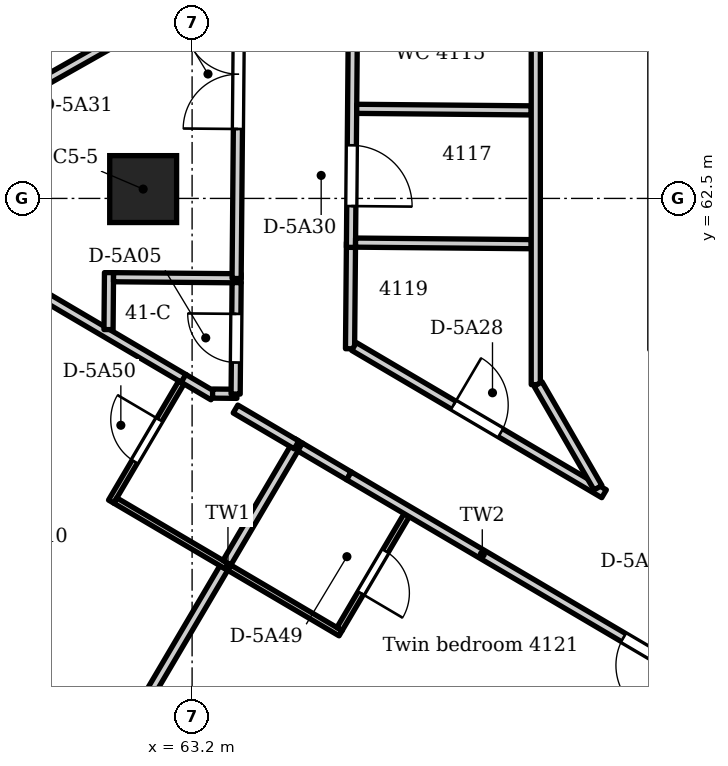
"""IFC4 building model, lengths in metres.
Left out: names, types, materials, properties, quantities, classifications, styles, units other than length and angle.
Written with IfcOpenShell. Run it as: python <this file> out.ifc"""

import sys

from ifc_helpers import new_model, si_unit, direction, frame, frame_2d, origin, origin_2d, place, context, subcontext, project, spatial, polyline, rectangle, circle, outline, extrude, element, fill, save


model = new_model("IFC4")
c1 = context("Model", 3, precision=1e-05, world=origin(), true_north=direction((0.0, 1.0)))
c2 = subcontext(c1, "Body", "Model", "MODEL_VIEW")
j1 = project(units=[si_unit("LENGTHUNIT", "METRE"), si_unit("PLANEANGLEUNIT", "RADIAN")], contexts=[c1])
p1 = place(None, origin())
s1 = spatial("IfcSite", under=j1, at=p1, CompositionType="ELEMENT")
p2 = place(p1, origin())
s2 = spatial("IfcBuilding", under=s1, at=p2, CompositionType="ELEMENT")
p3 = place(p2, frame((0.0, 0.0, 161.1)))
s3 = spatial("IfcBuildingStorey", under=s2, at=p3, CompositionType="ELEMENT", Elevation=161.1)
p4 = place(p3, frame((62.395, 62.654, -0.35), z_axis=(0.0, 0.0, 1.0), x_axis=(1.0, 0.0, 0.0)))
e1 = element("IfcColumn", 1, at=p4, inside=s3, PredefinedType="COLUMN", context=c2, shape_type="SweptSolid", body=[
    extrude(circle(Radius=0.55, at=origin_2d()), origin(), (0.0, 0.0, 1.0), 3.95),
])
p5 = place(p3, frame((90.139, 36.597, 0.0), z_axis=(0.0, 0.0, 1.0), x_axis=(-0.861630336939, 0.507536365659, 0.0)))
e2 = element("IfcWall", 2, at=p5, inside=s3, PredefinedType="SOLIDWALL", context=c2, shape_type="SweptSolid", body=[
    extrude(outline(polyline([(0.149, 0.075), (0.149, -0.075), (43.617, -0.075), (43.617, 0.075), (0.149, 0.075)])), origin(), (0.0, 0.0, 1.0), 3.3),
])
p6 = place(p5, frame((1.224, 0.0, 0.0)))
e3 = element("IfcOpeningElement", 3, at=p6, cuts=e2, PredefinedType="OPENING", context=c2, shape_type="SweptSolid", body=[
    extrude(rectangle(XDim=1.8, YDim=2.6, at=frame_2d((0.9, 1.3))), frame((0.0, 0.085, 0.0), z_axis=(0.0, -1.0, 0.0), x_axis=(1.0, 0.0, 0.0)), (0.0, 0.0, 1.0), 0.17),
])
p7 = place(p5, frame((4.571, 0.0, 0.0)))
e4 = element("IfcOpeningElement", 4, at=p7, cuts=e2, PredefinedType="OPENING", context=c2, shape_type="SweptSolid", body=[
    extrude(rectangle(XDim=1.8, YDim=2.6, at=frame_2d((0.9, 1.3))), frame((0.0, 0.085, 0.0), z_axis=(0.0, -1.0, 0.0), x_axis=(1.0, 0.0, 0.0)), (0.0, 0.0, 1.0), 0.17),
])
p8 = place(p5, frame((8.218, 0.0, 0.0)))
e5 = element("IfcOpeningElement", 5, at=p8, cuts=e2, PredefinedType="OPENING", context=c2, shape_type="SweptSolid", body=[
    extrude(rectangle(XDim=1.8, YDim=2.6, at=frame_2d((0.9, 1.3))), frame((0.0, 0.085, 0.0), z_axis=(0.0, -1.0, 0.0), x_axis=(1.0, 0.0, 0.0)), (0.0, 0.0, 1.0), 0.17),
])
p9 = place(p5, frame((11.865, 0.0, 0.0)))
e6 = element("IfcOpeningElement", 6, at=p9, cuts=e2, PredefinedType="OPENING", context=c2, shape_type="SweptSolid", body=[
    extrude(rectangle(XDim=1.8, YDim=2.6, at=frame_2d((0.9, 1.3))), frame((0.0, 0.085, 0.0), z_axis=(0.0, -1.0, 0.0), x_axis=(1.0, 0.0, 0.0)), (0.0, 0.0, 1.0), 0.17),
])
p10 = place(p5, frame((15.512, 0.0, 0.0)))
e7 = element("IfcOpeningElement", 7, at=p10, cuts=e2, PredefinedType="OPENING", context=c2, shape_type="SweptSolid", body=[
    extrude(rectangle(XDim=1.8, YDim=2.6, at=frame_2d((0.9, 1.3))), frame((0.0, 0.085, 0.0), z_axis=(0.0, -1.0, 0.0), x_axis=(1.0, 0.0, 0.0)), (0.0, 0.0, 1.0), 0.17),
])
p11 = place(p5, frame((19.16, 0.0, 0.0)))
e8 = element("IfcOpeningElement", 8, at=p11, cuts=e2, PredefinedType="OPENING", context=c2, shape_type="SweptSolid", body=[
    extrude(rectangle(XDim=1.8, YDim=2.6, at=frame_2d((0.9, 1.3))), frame((0.0, 0.085, 0.0), z_axis=(0.0, -1.0, 0.0), x_axis=(1.0, 0.0, 0.0)), (0.0, 0.0, 1.0), 0.17),
])
p12 = place(p5, frame((22.807, 0.0, 0.0)))
e9 = element("IfcOpeningElement", 9, at=p12, cuts=e2, PredefinedType="OPENING", context=c2, shape_type="SweptSolid", body=[
    extrude(rectangle(XDim=1.8, YDim=2.6, at=frame_2d((0.9, 1.3))), frame((0.0, 0.085, 0.0), z_axis=(0.0, -1.0, 0.0), x_axis=(1.0, 0.0, 0.0)), (0.0, 0.0, 1.0), 0.17),
])
p13 = place(p5, frame((26.454, 0.0, 0.0)))
e10 = element("IfcOpeningElement", 10, at=p13, cuts=e2, PredefinedType="OPENING", context=c2, shape_type="SweptSolid", body=[
    extrude(rectangle(XDim=1.8, YDim=2.6, at=frame_2d((0.9, 1.3))), frame((0.0, 0.085, 0.0), z_axis=(0.0, -1.0, 0.0), x_axis=(1.0, 0.0, 0.0)), (0.0, 0.0, 1.0), 0.17),
])
p14 = place(p5, frame((30.101, 0.0, 0.0)))
e11 = element("IfcOpeningElement", 11, at=p14, cuts=e2, PredefinedType="OPENING", context=c2, shape_type="SweptSolid", body=[
    extrude(rectangle(XDim=1.8, YDim=2.6, at=frame_2d((0.9, 1.3))), frame((0.0, 0.085, 0.0), z_axis=(0.0, -1.0, 0.0), x_axis=(1.0, 0.0, 0.0)), (0.0, 0.0, 1.0), 0.17),
])
p15 = place(p5, frame((33.748, 0.0, 0.0)))
e12 = element("IfcOpeningElement", 12, at=p15, cuts=e2, PredefinedType="OPENING", context=c2, shape_type="SweptSolid", body=[
    extrude(rectangle(XDim=1.8, YDim=2.6, at=frame_2d((0.9, 1.3))), frame((0.0, 0.085, 0.0), z_axis=(0.0, -1.0, 0.0), x_axis=(1.0, 0.0, 0.0)), (0.0, 0.0, 1.0), 0.17),
])
p16 = place(p5, frame((37.396, 0.0, 0.0)))
e13 = element("IfcOpeningElement", 13, at=p16, cuts=e2, PredefinedType="OPENING", context=c2, shape_type="SweptSolid", body=[
    extrude(rectangle(XDim=1.8, YDim=2.6, at=frame_2d((0.9, 1.3))), frame((0.0, 0.085, 0.0), z_axis=(0.0, -1.0, 0.0), x_axis=(1.0, 0.0, 0.0)), (0.0, 0.0, 1.0), 0.17),
])
p17 = place(p5, frame((40.743, 0.0, 0.0)))
e14 = element("IfcOpeningElement", 14, at=p17, cuts=e2, PredefinedType="OPENING", context=c2, shape_type="SweptSolid", body=[
    extrude(rectangle(XDim=1.8, YDim=2.6, at=frame_2d((0.9, 1.3))), frame((0.0, 0.085, 0.0), z_axis=(0.0, -1.0, 0.0), x_axis=(1.0, 0.0, 0.0)), (0.0, 0.0, 1.0), 0.17),
])
p18 = place(p3, frame((58.694, 62.112, 0.0), z_axis=(0.0, 0.0, 1.0), x_axis=(0.861647069411, -0.507507958336, 0.0)))
e15 = element("IfcWall", 15, at=p18, inside=s3, PredefinedType="PARTITIONING", context=c2, shape_type="SweptSolid", body=[
    extrude(rectangle(XDim=5.073, YDim=0.15, at=frame_2d((2.537, 0.0))), origin(), (0.0, 0.0, 1.0), 3.3),
])
p19 = place(p3, frame((60.113, 64.057, 0.0), z_axis=(0.0, 0.0, 1.0), x_axis=(0.870300828713, 0.492520524995, 0.0)))
e16 = element("IfcWall", 16, at=p19, inside=s3, PredefinedType="PARTITIONING", context=c2, shape_type="SweptSolid", body=[
    extrude(rectangle(XDim=3.906, YDim=0.15, at=frame_2d((1.953, 0.0))), origin(), (0.0, 0.0, 1.0), 3.3),
])
p20 = place(p3, frame((61.826, 60.343, 0.0), z_axis=(0.0, 0.0, 1.0), x_axis=(0.008337386084, 0.999965243393, 0.0)))
e17 = element("IfcWall", 17, at=p20, inside=s3, PredefinedType="PARTITIONING", context=c2, shape_type="SweptSolid", body=[
    extrude(rectangle(XDim=0.937, YDim=0.15, at=frame_2d((0.469, 0.0))), origin(), (0.0, 0.0, 1.0), 3.3),
])
p21 = place(p3, frame((61.908, 61.204, 0.0), z_axis=(0.0, 0.0, 1.0), x_axis=(0.999962964822, -0.008606333961, 0.0)))
e18 = element("IfcWall", 18, at=p21, inside=s3, PredefinedType="PARTITIONING", context=c2, shape_type="SweptSolid", body=[
    extrude(rectangle(XDim=2.099, YDim=0.15, at=frame_2d((1.05, 0.0))), origin(), (0.0, 0.0, 1.0), 3.3),
])
p22 = place(p3, frame((61.894, 53.322, 0.0), z_axis=(0.0, 0.0, 1.0), x_axis=(0.507657247854, 0.86155912084, 0.0)))
e19 = element("IfcWall", 19, at=p22, inside=s3, PredefinedType="PARTITIONING", context=c2, shape_type="SweptSolid", body=[
    extrude(rectangle(XDim=3.6, YDim=0.15, at=frame_2d((1.8, 0.0))), origin(), (0.0, 0.0, 1.0), 3.3),
])
p23 = place(p3, frame((61.869, 57.514, 0.0), z_axis=(0.0, 0.0, 1.0), x_axis=(0.50769515182, 0.861536785528, 0.0)))
e20 = element("IfcWall", 20, at=p23, inside=s3, PredefinedType="PARTITIONING", context=c2, shape_type="SweptSolid", body=[
    extrude(rectangle(XDim=2.276, YDim=0.1, at=frame_2d((1.138, 0.0))), origin(), (0.0, 0.0, 1.0), 3.3),
])
p24 = place(p23, frame((0.763, 0.0, 0.0)))
e21 = element("IfcOpeningElement", 21, at=p24, cuts=e20, PredefinedType="OPENING", context=c2, shape_type="SweptSolid", body=[
    extrude(rectangle(XDim=0.8, YDim=2.1, at=frame_2d((0.4, 1.05))), frame((0.0, 0.06, 0.0), z_axis=(0.0, -1.0, 0.0), x_axis=(1.0, 0.0, 0.0)), (0.0, 0.0, 1.0), 0.12),
])
p25 = place(p3, frame((61.937, 57.531, 0.0), z_axis=(0.0, 0.0, 1.0), x_axis=(0.861687435641, -0.507439418313, 0.0)))
e22 = element("IfcWall", 22, at=p25, inside=s3, PredefinedType="PARTITIONING", context=c2, shape_type="SweptSolid", body=[
    extrude(rectangle(XDim=4.3, YDim=0.1, at=frame_2d((2.15, 0.0))), origin(), (0.0, 0.0, 1.0), 3.3),
])
p26 = place(p3, frame((63.059, 59.541, 0.0), z_axis=(0.0, 0.0, 1.0), x_axis=(0.861380392191, -0.507960451167, 0.0)))
e23 = element("IfcWall", 23, at=p26, inside=s3, PredefinedType="PARTITIONING", context=c2, shape_type="SweptSolid", body=[
    extrude(rectangle(XDim=0.567, YDim=0.15, at=frame_2d((0.284, 0.0))), origin(), (0.0, 0.0, 1.0), 3.3),
])
p27 = place(p3, frame((63.537, 59.291, 0.0), z_axis=(0.0, 0.0, 1.0), x_axis=(0.99995807265, -0.009157125207, 0.0)))
e24 = element("IfcWall", 24, at=p27, inside=s3, PredefinedType="PARTITIONING", context=c2, shape_type="SweptSolid", body=[
    extrude(rectangle(XDim=0.4, YDim=0.15, at=frame_2d((0.2, 0.0))), origin(), (0.0, 0.0, 1.0), 3.3),
])
p28 = place(p3, frame((63.772, 56.509, 0.0), z_axis=(0.0, 0.0, 1.0), x_axis=(0.507359649966, 0.861734405479, 0.0)))
e25 = element("IfcWall", 25, at=p28, inside=s3, PredefinedType="PARTITIONING", context=c2, shape_type="SweptSolid", body=[
    extrude(rectangle(XDim=2.325, YDim=0.15, at=frame_2d((1.163, 0.0))), origin(), (0.0, 0.0, 1.0), 3.3),
])
p29 = place(p3, frame((63.914, 59.037, 0.0), z_axis=(0.0, 0.0, 1.0), x_axis=(0.861518804546, -0.507725663536, 0.0)))
e26 = element("IfcWall", 26, at=p29, inside=s3, PredefinedType="PARTITIONING", context=c2, shape_type="SweptSolid", body=[
    extrude(rectangle(XDim=1.164, YDim=0.15, at=frame_2d((0.582, 0.0))), origin(), (0.0, 0.0, 1.0), 3.3),
])
p30 = place(p3, frame((63.916, 59.283, 0.0), z_axis=(0.0, 0.0, 1.0), x_axis=(0.008923459297, 0.999960185144, 0.0)))
e27 = element("IfcWall", 27, at=p30, inside=s3, PredefinedType="PARTITIONING", context=c2, shape_type="SweptSolid", body=[
    extrude(rectangle(XDim=1.833, YDim=0.15, at=frame_2d((0.917, 0.0))), origin(), (0.0, 0.0, 1.0), 3.3),
])
p31 = place(p30, frame((0.519, 0.0, 0.0)))
e28 = element("IfcOpeningElement", 28, at=p31, cuts=e27, PredefinedType="OPENING", context=c2, shape_type="SweptSolid", body=[
    extrude(rectangle(XDim=0.8, YDim=2.1, at=frame_2d((0.4, 1.05))), frame((0.0, 0.085, 0.0), z_axis=(0.0, -1.0, 0.0), x_axis=(1.0, 0.0, 0.0)), (0.0, 0.0, 1.0), 0.17),
])
p32 = place(p3, frame((63.932, 61.183, 0.0), z_axis=(0.0, 0.0, 1.0), x_axis=(0.008717466764, 0.999962002165, 0.0)))
e29 = element("IfcWall", 29, at=p32, inside=s3, PredefinedType="PARTITIONING", context=c2, shape_type="SweptSolid", body=[
    extrude(rectangle(XDim=4.985, YDim=0.15, at=frame_2d((2.493, 0.0))), origin(), (0.0, 0.0, 1.0), 2.75),
])
p33 = place(p32, frame((2.459, 0.0, 0.0)))
e30 = element("IfcOpeningElement", 30, at=p33, cuts=e29, PredefinedType="OPENING", context=c2, shape_type="SweptSolid", body=[
    extrude(rectangle(XDim=1.8, YDim=2.1, at=frame_2d((0.9, 1.05))), frame((0.0, 0.085, 0.0), z_axis=(0.0, -1.0, 0.0), x_axis=(1.0, 0.0, 0.0)), (0.0, 0.0, 1.0), 0.17),
])
p34 = place(p3, frame((64.976, 58.412, 0.0), z_axis=(0.0, 0.0, 1.0), x_axis=(0.861348284073, -0.508014894982, 0.0)))
e31 = element("IfcWall", 31, at=p34, inside=s3, PredefinedType="PARTITIONING", context=c2, shape_type="SweptSolid", body=[
    extrude(rectangle(XDim=0.933, YDim=0.15, at=frame_2d((0.466, 0.0))), origin(), (0.0, 0.0, 1.0), 3.3),
])
p35 = place(p3, frame((65.625, 55.418, 0.0), z_axis=(0.0, 0.0, 1.0), x_axis=(0.507893177668, 0.861420060179, 0.0)))
e32 = element("IfcWall", 32, at=p35, inside=s3, PredefinedType="PARTITIONING", context=c2, shape_type="SweptSolid", body=[
    extrude(rectangle(XDim=2.175, YDim=0.1, at=frame_2d((1.087, 0.0))), origin(), (0.0, 0.0, 1.0), 3.3),
])
p36 = place(p35, frame((0.687, 0.0, 0.0)))
e33 = element("IfcOpeningElement", 33, at=p36, cuts=e32, PredefinedType="OPENING", context=c2, shape_type="SweptSolid", body=[
    extrude(rectangle(XDim=0.8, YDim=2.1, at=frame_2d((0.4, 1.05))), frame((0.0, 0.06, 0.0), z_axis=(0.0, -1.0, 0.0), x_axis=(1.0, 0.0, 0.0)), (0.0, 0.0, 1.0), 0.12),
])
p37 = place(p3, frame((65.779, 57.938, 0.0), z_axis=(0.0, 0.0, 1.0), x_axis=(0.861623120435, -0.507548616718, 0.0)))
e34 = element("IfcWall", 34, at=p37, inside=s3, PredefinedType="PARTITIONING", context=c2, shape_type="SweptSolid", body=[
    extrude(rectangle(XDim=7.004, YDim=0.15, at=frame_2d((3.502, 0.0))), origin(), (0.0, 0.0, 1.0), 3.3),
])
p38 = place(p37, frame((5.24, 0.0, 0.0)))
e35 = element("IfcOpeningElement", 35, at=p38, cuts=e34, PredefinedType="OPENING", context=c2, shape_type="SweptSolid", body=[
    extrude(rectangle(XDim=0.9, YDim=2.1, at=frame_2d((0.45, 1.05))), frame((0.0, 0.085, 0.0), z_axis=(0.0, -1.0, 0.0), x_axis=(1.0, 0.0, 0.0)), (0.0, 0.0, 1.0), 0.17),
])
p39 = place(p3, frame((65.797, 60.028, 0.0), z_axis=(0.0, 0.0, 1.0), x_axis=(0.00892821556, 0.999960142689, 0.0)))
e36 = element("IfcWall", 36, at=p39, inside=s3, PredefinedType="PARTITIONING", context=c2, shape_type="SweptSolid", body=[
    extrude(rectangle(XDim=1.75, YDim=0.15, at=frame_2d((0.875, 0.0))), origin(), (0.0, 0.0, 1.0), 3.3),
])
p40 = place(p3, frame((65.863, 60.065, 0.0), z_axis=(0.0, 0.0, 1.0), x_axis=(0.861635540959, -0.507527530835, 0.0)))
e37 = element("IfcWall", 37, at=p40, inside=s3, PredefinedType="PARTITIONING", context=c2, shape_type="SweptSolid", body=[
    extrude(rectangle(XDim=4.772, YDim=0.15, at=frame_2d((2.386, 0.0))), origin(), (0.0, 0.0, 1.0), 3.3),
])
p41 = place(p40, frame((1.899, 0.0, 0.0)))
e38 = element("IfcOpeningElement", 38, at=p41, cuts=e37, PredefinedType="OPENING", context=c2, shape_type="SweptSolid", body=[
    extrude(rectangle(XDim=0.9, YDim=2.1, at=frame_2d((0.45, 1.05))), frame((0.0, 0.085, 0.0), z_axis=(0.0, -1.0, 0.0), x_axis=(1.0, 0.0, 0.0)), (0.0, 0.0, 1.0), 0.17),
])
p42 = place(p3, frame((65.812, 61.695, 0.0), z_axis=(0.0, 0.0, 1.0), x_axis=(0.008521236962, 0.999963693601, 0.0)))
e39 = element("IfcWall", 39, at=p42, inside=s3, PredefinedType="PARTITIONING", context=c2, shape_type="SweptSolid", body=[
    extrude(rectangle(XDim=3.524, YDim=0.15, at=frame_2d((1.762, 0.0))), origin(), (0.0, 0.0, 1.0), 2.75),
])
p43 = place(p42, frame((0.679, 0.0, 0.0)))
e40 = element("IfcOpeningElement", 40, at=p43, cuts=e39, PredefinedType="OPENING", context=c2, shape_type="SweptSolid", body=[
    extrude(rectangle(XDim=1.0, YDim=2.1, at=frame_2d((0.5, 1.05))), frame((0.0, 0.085, 0.0), z_axis=(0.0, -1.0, 0.0), x_axis=(1.0, 0.0, 0.0)), (0.0, 0.0, 1.0), 0.17),
])
p44 = place(p3, frame((65.888, 61.773, 0.0), z_axis=(0.0, 0.0, 1.0), x_axis=(0.999961385679, -0.008787897931, 0.0)))
e41 = element("IfcWall", 41, at=p44, inside=s3, PredefinedType="PARTITIONING", context=c2, shape_type="SweptSolid", body=[
    extrude(rectangle(XDim=2.889, YDim=0.15, at=frame_2d((1.445, 0.0))), origin(), (0.0, 0.0, 1.0), 3.3),
])
p45 = place(p3, frame((65.907, 63.973, 0.0), z_axis=(0.0, 0.0, 1.0), x_axis=(0.999960115563, -0.008931253159, 0.0)))
e42 = element("IfcWall", 42, at=p45, inside=s3, PredefinedType="PARTITIONING", context=c2, shape_type="SweptSolid", body=[
    extrude(rectangle(XDim=2.87, YDim=0.15, at=frame_2d((1.435, 0.0))), origin(), (0.0, 0.0, 1.0), 3.3),
])
p46 = place(p3, frame((68.179, 49.619, 0.0), z_axis=(0.0, 0.0, 1.0), x_axis=(0.507603061138, 0.861591047031, 0.0)))
e43 = element("IfcWall", 43, at=p46, inside=s3, PredefinedType="PARTITIONING", context=c2, shape_type="SweptSolid", body=[
    extrude(rectangle(XDim=5.874, YDim=0.15, at=frame_2d((2.937, 0.0))), origin(), (0.0, 0.0, 1.0), 3.3),
])
p47 = place(p3, frame((68.852, 59.438, 0.0), z_axis=(0.0, 0.0, 1.0), x_axis=(0.0, 1.0, 0.0)))
e44 = element("IfcWall", 44, at=p47, inside=s3, PredefinedType="PARTITIONING", context=c2, shape_type="SweptSolid", body=[
    extrude(rectangle(XDim=6.124, YDim=0.15, at=frame_2d((3.062, 0.0))), origin(), (0.0, 0.0, 1.0), 2.75),
])
p48 = place(p3, frame((68.889, 59.448, 0.0), z_axis=(0.0, 0.0, 1.0), x_axis=(0.500259007655, -0.865875813994, 0.0)))
e45 = element("IfcWall", 45, at=p48, inside=s3, PredefinedType="PARTITIONING", context=c2, shape_type="SweptSolid", body=[
    extrude(rectangle(XDim=1.969, YDim=0.15, at=frame_2d((0.985, 0.0))), origin(), (0.0, 0.0, 1.0), 3.3),
])
p49 = place(p15, origin())
e46 = element("IfcDoor", 46, at=p49, inside=s3, OperationType="SLIDING_TO_LEFT", PredefinedType="DOOR", context=c2, shape_type="SweptSolid", body=[
    extrude(rectangle(XDim=1.8, YDim=2.6, at=frame_2d((0.9, 1.3))), frame((0.0, 0.025, 0.0), z_axis=(0.0, -1.0, 0.0), x_axis=(1.0, 0.0, 0.0)), (0.0, 0.0, 1.0), 0.05),
])
fill(e12, e46)
p50 = place(p33, origin())
e47 = element("IfcDoor", 47, at=p50, inside=s3, OperationType="DOUBLE_DOOR_DOUBLE_SWING", PredefinedType="DOOR", context=c2, shape_type="SweptSolid", body=[
    extrude(rectangle(XDim=1.8, YDim=2.1, at=frame_2d((0.9, 1.05))), frame((0.0, 0.025, 0.0), z_axis=(0.0, -1.0, 0.0), x_axis=(1.0, 0.0, 0.0)), (0.0, 0.0, 1.0), 0.05),
])
fill(e30, e47)
p51 = place(p31, origin())
e48 = element("IfcDoor", 48, at=p51, inside=s3, OperationType="SINGLE_SWING_RIGHT", PredefinedType="DOOR", context=c2, shape_type="SweptSolid", body=[
    extrude(rectangle(XDim=0.8, YDim=2.1, at=frame_2d((0.4, 1.05))), frame((0.0, 0.025, 0.0), z_axis=(0.0, -1.0, 0.0), x_axis=(1.0, 0.0, 0.0)), (0.0, 0.0, 1.0), 0.05),
])
fill(e28, e48)
p52 = place(p38, frame((0.9, 0.0, 0.0), z_axis=(0.0, 0.0, 1.0), x_axis=(-1.0, 0.0, 0.0)))
e49 = element("IfcDoor", 49, at=p52, inside=s3, OperationType="SINGLE_SWING_LEFT", PredefinedType="DOOR", context=c2, shape_type="SweptSolid", body=[
    extrude(rectangle(XDim=0.9, YDim=2.1, at=frame_2d((0.45, 1.05))), frame((0.0, 0.025, 0.0), z_axis=(0.0, -1.0, 0.0), x_axis=(1.0, 0.0, 0.0)), (0.0, 0.0, 1.0), 0.05),
])
fill(e35, e49)
p53 = place(p41, origin())
e50 = element("IfcDoor", 50, at=p53, inside=s3, OperationType="SINGLE_SWING_LEFT", PredefinedType="DOOR", context=c2, shape_type="SweptSolid", body=[
    extrude(rectangle(XDim=0.9, YDim=2.1, at=frame_2d((0.45, 1.05))), frame((0.0, 0.025, 0.0), z_axis=(0.0, -1.0, 0.0), x_axis=(1.0, 0.0, 0.0)), (0.0, 0.0, 1.0), 0.05),
])
fill(e38, e50)
p54 = place(p43, frame((1.0, 0.0, 0.0), z_axis=(0.0, 0.0, 1.0), x_axis=(-1.0, 0.0, 0.0)))
e51 = element("IfcDoor", 51, at=p54, inside=s3, OperationType="SINGLE_SWING_RIGHT", PredefinedType="DOOR", context=c2, shape_type="SweptSolid", body=[
    extrude(rectangle(XDim=1.0, YDim=2.1, at=frame_2d((0.5, 1.05))), frame((0.0, 0.025, 0.0), z_axis=(0.0, -1.0, 0.0), x_axis=(1.0, 0.0, 0.0)), (0.0, 0.0, 1.0), 0.05),
])
fill(e40, e51)
p55 = place(p36, frame((0.8, 0.0, 0.0), z_axis=(0.0, 0.0, 1.0), x_axis=(-1.0, 0.0, 0.0)))
e52 = element("IfcDoor", 52, at=p55, inside=s3, OperationType="SINGLE_SWING_RIGHT", PredefinedType="DOOR", context=c2, shape_type="SweptSolid", body=[
    extrude(rectangle(XDim=0.8, YDim=2.1, at=frame_2d((0.4, 1.05))), frame((0.0, 0.025, 0.0), z_axis=(0.0, -1.0, 0.0), x_axis=(1.0, 0.0, 0.0)), (0.0, 0.0, 1.0), 0.05),
])
fill(e33, e52)
p56 = place(p24, origin())
e53 = element("IfcDoor", 53, at=p56, inside=s3, OperationType="SINGLE_SWING_RIGHT", PredefinedType="DOOR", context=c2, shape_type="SweptSolid", body=[
    extrude(rectangle(XDim=0.8, YDim=2.1, at=frame_2d((0.4, 1.05))), frame((0.0, 0.025, 0.0), z_axis=(0.0, -1.0, 0.0), x_axis=(1.0, 0.0, 0.0)), (0.0, 0.0, 1.0), 0.05),
])
fill(e21, e53)
save(model, sys.argv[1])
